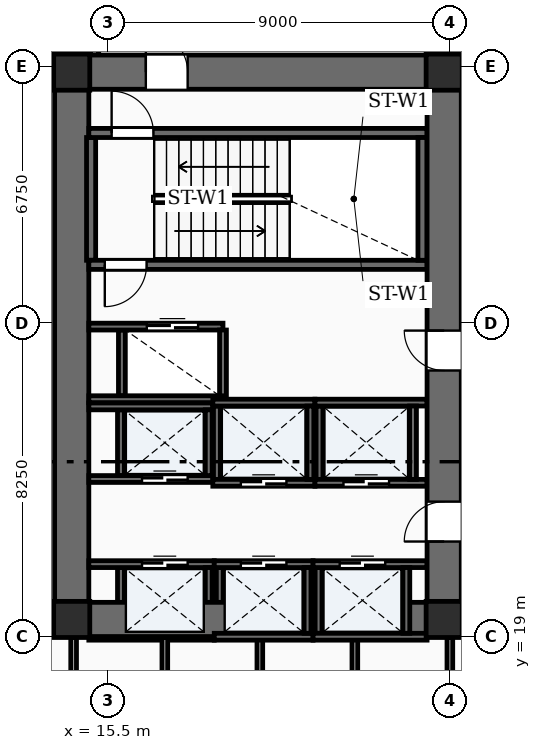
"""IFC4 building model, lengths in metres.
Left out: names, types, materials, properties, quantities, classifications, styles, units other than length and angle.
Written with IfcOpenShell. Run it as: python <this file> out.ifc"""

import sys

from ifc_helpers import new_model, si_unit, direction, frame, frame_2d, origin, origin_2d, place, context, subcontext, project, spatial, rectangle, extrude, element, fill, save


model = new_model("IFC4")
c1 = context("Model", 3, precision=1e-05, world=origin(), true_north=direction((0.0, 1.0)))
c2 = subcontext(c1, "Body", "Model", "MODEL_VIEW")
j1 = project(units=[si_unit("LENGTHUNIT", "METRE"), si_unit("PLANEANGLEUNIT", "RADIAN")], contexts=[c1])
p1 = place(None, origin())
s1 = spatial("IfcSite", under=j1, at=p1, CompositionType="ELEMENT")
p2 = place(p1, origin())
s2 = spatial("IfcBuilding", under=s1, at=p2, CompositionType="ELEMENT")
p3 = place(p2, origin())
s3 = spatial("IfcBuildingStorey", under=s2, at=p3, CompositionType="ELEMENT", Elevation=0.0)
p4 = place(p3, frame((14.55, 19.0, -0.45), z_axis=(0.0, 0.0, 1.0), x_axis=(0.0, 1.0, 0.0)))
e1 = element("IfcWall", 1, at=p4, inside=s3, PredefinedType="SHEAR", context=c2, shape_type="SweptSolid", body=[
    extrude(rectangle(XDim=15.3, YDim=0.9, at=frame_2d((7.65, 0.0))), origin(), (0.0, 0.0, 1.0), 8.1),
])
p5 = place(p3, frame((24.35, 19.0, -0.45), z_axis=(0.0, 0.0, 1.0), x_axis=(0.0, 1.0, 0.0)))
e2 = element("IfcWall", 2, at=p5, inside=s3, PredefinedType="SHEAR", context=c2, shape_type="SweptSolid", body=[
    extrude(rectangle(XDim=15.3, YDim=0.9, at=frame_2d((7.65, 0.0))), origin(), (0.0, 0.0, 1.0), 8.1),
])
p6 = place(p5, frame((2.5, 0.0, 0.45)))
e3 = element("IfcOpeningElement", 3, at=p6, cuts=e2, PredefinedType="OPENING", context=c2, shape_type="SweptSolid", body=[
    extrude(rectangle(XDim=1.05, YDim=2.15, at=frame_2d((0.525, 1.075))), frame((0.0, 0.46, 0.0), z_axis=(0.0, -1.0, 0.0), x_axis=(1.0, 0.0, 0.0)), (0.0, 0.0, 1.0), 0.92),
])
p7 = place(p5, frame((7.0, 0.0, 0.45)))
e4 = element("IfcOpeningElement", 4, at=p7, cuts=e2, PredefinedType="OPENING", context=c2, shape_type="SweptSolid", body=[
    extrude(rectangle(XDim=1.05, YDim=2.15, at=frame_2d((0.525, 1.075))), frame((0.0, 0.46, 0.0), z_axis=(0.0, -1.0, 0.0), x_axis=(1.0, 0.0, 0.0)), (0.0, 0.0, 1.0), 0.92),
])
p8 = place(p3, frame((15.0, 19.45, -0.45), z_axis=(0.0, 0.0, 1.0), x_axis=(1.0, 0.0, 0.0)))
e5 = element("IfcWall", 5, at=p8, inside=s3, PredefinedType="SHEAR", context=c2, shape_type="SweptSolid", body=[
    extrude(rectangle(XDim=8.9, YDim=0.9, at=frame_2d((4.45, 0.0))), origin(), (0.0, 0.0, 1.0), 8.1),
])
p9 = place(p3, frame((15.0, 33.85, -0.45), z_axis=(0.0, 0.0, 1.0), x_axis=(1.0, 0.0, 0.0)))
e6 = element("IfcWall", 6, at=p9, inside=s3, PredefinedType="SHEAR", context=c2, shape_type="SweptSolid", body=[
    extrude(rectangle(XDim=8.9, YDim=0.9, at=frame_2d((4.45, 0.0))), origin(), (0.0, 0.0, 1.0), 8.1),
])
p10 = place(p9, frame((1.5, 0.0, 0.45)))
e7 = element("IfcOpeningElement", 7, at=p10, cuts=e6, PredefinedType="OPENING", context=c2, shape_type="SweptSolid", body=[
    extrude(rectangle(XDim=1.1, YDim=2.15, at=frame_2d((0.55, 1.075))), frame((0.0, 0.46, 0.0), z_axis=(0.0, -1.0, 0.0), x_axis=(1.0, 0.0, 0.0)), (0.0, 0.0, 1.0), 0.92),
])
for number, where, z_axis, x_axis in (
    (8, (14.55, 19.45, -0.45), (0.0, 0.0, 1.0), (1.0, 0.0, 0.0)),
    (9, (24.35, 19.45, -0.45), (0.0, 0.0, 1.0), (1.0, 0.0, 0.0)),
    (10, (14.55, 33.85, -0.45), (0.0, 0.0, 1.0), (1.0, 0.0, 0.0)),
    (11, (24.35, 33.85, -0.45), (0.0, 0.0, 1.0), (1.0, 0.0, 0.0)),
):
    element("IfcColumn", number, at=place(p3, frame(where, z_axis=z_axis, x_axis=x_axis)), inside=s3, PredefinedType="COLUMN", context=c2, shape_type="SweptSolid", body=[
        extrude(rectangle(XDim=0.95, YDim=0.95, at=origin_2d()), origin(), (0.0, 0.0, 1.0), 8.1),
    ])
p11 = place(p3, frame((23.9, 28.78, 0.0), z_axis=(0.0, 0.0, 1.0), x_axis=(-1.0, 0.0, 0.0)))
e12 = element("IfcWall", 12, at=p11, inside=s3, PredefinedType="SOLIDWALL", context=c2, shape_type="SweptSolid", body=[
    extrude(rectangle(XDim=8.9, YDim=0.24, at=frame_2d((4.45, 0.0))), origin(), (0.0, 0.0, 1.0), 7.65),
])
p12 = place(p11, frame((7.38, 0.0, 0.0)))
e13 = element("IfcOpeningElement", 13, at=p12, cuts=e12, PredefinedType="OPENING", context=c2, shape_type="SweptSolid", body=[
    extrude(rectangle(XDim=1.1, YDim=2.15, at=frame_2d((0.55, 1.075))), frame((0.0, 0.13, 0.0), z_axis=(0.0, -1.0, 0.0), x_axis=(1.0, 0.0, 0.0)), (0.0, 0.0, 1.0), 0.26),
])
p13 = place(p3, frame((15.0, 32.25, 0.0), z_axis=(0.0, 0.0, 1.0), x_axis=(1.0, 0.0, 0.0)))
e14 = element("IfcWall", 14, at=p13, inside=s3, PredefinedType="SOLIDWALL", context=c2, shape_type="SweptSolid", body=[
    extrude(rectangle(XDim=8.9, YDim=0.24, at=frame_2d((4.45, 0.0))), origin(), (0.0, 0.0, 1.0), 7.65),
])
p14 = place(p13, frame((0.6, 0.0, 0.0)))
e15 = element("IfcOpeningElement", 15, at=p14, cuts=e14, PredefinedType="OPENING", context=c2, shape_type="SweptSolid", body=[
    extrude(rectangle(XDim=1.1, YDim=2.15, at=frame_2d((0.55, 1.075))), frame((0.0, 0.13, 0.0), z_axis=(0.0, -1.0, 0.0), x_axis=(1.0, 0.0, 0.0)), (0.0, 0.0, 1.0), 0.26),
])
for number, where, z_axis, x_axis in (
    (16, (15.06, 28.9, 0.0), (0.0, 0.0, 1.0), (0.0, 1.0, 0.0)),
    (17, (23.78, 28.9, 0.0), (0.0, 0.0, 1.0), (0.0, 1.0, 0.0)),
):
    element("IfcWall", number, at=place(p3, frame(where, z_axis=z_axis, x_axis=x_axis)), inside=s3, PredefinedType="SOLIDWALL", context=c2, shape_type="SweptSolid", body=[
        extrude(rectangle(XDim=3.23, YDim=0.24, at=frame_2d((1.615, 0.0))), origin(), (0.0, 0.0, 1.0), 7.65),
    ])
p15 = place(p3, frame((15.0, 20.905, 0.0), z_axis=(0.0, 0.0, 1.0), x_axis=(1.0, 0.0, 0.0)))
e18 = element("IfcWall", 18, at=p15, inside=s3, PredefinedType="SOLIDWALL", context=c2, shape_type="SweptSolid", body=[
    extrude(rectangle(XDim=3.3, YDim=0.18, at=frame_2d((1.65, 0.0))), origin(), (0.0, 0.0, 1.0), 7.65),
])
p16 = place(p15, frame((1.4, 0.0, 0.0)))
e19 = element("IfcOpeningElement", 19, at=p16, cuts=e18, PredefinedType="OPENING", context=c2, shape_type="SweptSolid", body=[
    extrude(rectangle(XDim=1.2, YDim=2.2, at=frame_2d((0.6, 1.1))), frame((0.0, 0.1, 0.0), z_axis=(0.0, -1.0, 0.0), x_axis=(1.0, 0.0, 0.0)), (0.0, 0.0, 1.0), 0.2),
])
p17 = place(p3, frame((15.0, 18.995, 0.0), z_axis=(0.0, 0.0, 1.0), x_axis=(1.0, 0.0, 0.0)))
e20 = element("IfcWall", 20, at=p17, inside=s3, PredefinedType="SOLIDWALL", context=c2, shape_type="SweptSolid", body=[
    extrude(rectangle(XDim=3.3, YDim=0.18, at=frame_2d((1.65, 0.0))), origin(), (0.0, 0.0, 1.0), 7.65),
])
for number, where, z_axis, x_axis in (
    (21, (15.845, 19.085, 0.0), (0.0, 0.0, 1.0), (0.0, 1.0, 0.0)),
    (22, (18.155, 19.085, 0.0), (0.0, 0.0, 1.0), (0.0, 1.0, 0.0)),
):
    element("IfcWall", number, at=place(p3, frame(where, z_axis=z_axis, x_axis=x_axis)), inside=s3, PredefinedType="SOLIDWALL", context=c2, shape_type="SweptSolid", body=[
        extrude(rectangle(XDim=1.73, YDim=0.18, at=frame_2d((0.865, 0.0))), origin(), (0.0, 0.0, 1.0), 7.65),
    ])
p18 = place(p3, frame((18.3, 20.905, 0.0), z_axis=(0.0, 0.0, 1.0), x_axis=(1.0, 0.0, 0.0)))
e23 = element("IfcWall", 23, at=p18, inside=s3, PredefinedType="SOLIDWALL", context=c2, shape_type="SweptSolid", body=[
    extrude(rectangle(XDim=2.6, YDim=0.18, at=frame_2d((1.3, 0.0))), origin(), (0.0, 0.0, 1.0), 7.65),
])
p19 = place(p18, frame((0.7, 0.0, 0.0)))
e24 = element("IfcOpeningElement", 24, at=p19, cuts=e23, PredefinedType="OPENING", context=c2, shape_type="SweptSolid", body=[
    extrude(rectangle(XDim=1.2, YDim=2.2, at=frame_2d((0.6, 1.1))), frame((0.0, 0.1, 0.0), z_axis=(0.0, -1.0, 0.0), x_axis=(1.0, 0.0, 0.0)), (0.0, 0.0, 1.0), 0.2),
])
p20 = place(p3, frame((18.3, 18.995, 0.0), z_axis=(0.0, 0.0, 1.0), x_axis=(1.0, 0.0, 0.0)))
e25 = element("IfcWall", 25, at=p20, inside=s3, PredefinedType="SOLIDWALL", context=c2, shape_type="SweptSolid", body=[
    extrude(rectangle(XDim=2.6, YDim=0.18, at=frame_2d((1.3, 0.0))), origin(), (0.0, 0.0, 1.0), 7.65),
])
for number, where, z_axis, x_axis in (
    (26, (18.445, 19.085, 0.0), (0.0, 0.0, 1.0), (0.0, 1.0, 0.0)),
    (27, (20.755, 19.085, 0.0), (0.0, 0.0, 1.0), (0.0, 1.0, 0.0)),
):
    element("IfcWall", number, at=place(p3, frame(where, z_axis=z_axis, x_axis=x_axis)), inside=s3, PredefinedType="SOLIDWALL", context=c2, shape_type="SweptSolid", body=[
        extrude(rectangle(XDim=1.73, YDim=0.18, at=frame_2d((0.865, 0.0))), origin(), (0.0, 0.0, 1.0), 7.65),
    ])
p21 = place(p3, frame((20.9, 20.905, 0.0), z_axis=(0.0, 0.0, 1.0), x_axis=(1.0, 0.0, 0.0)))
e28 = element("IfcWall", 28, at=p21, inside=s3, PredefinedType="SOLIDWALL", context=c2, shape_type="SweptSolid", body=[
    extrude(rectangle(XDim=3.0, YDim=0.18, at=frame_2d((1.5, 0.0))), origin(), (0.0, 0.0, 1.0), 7.65),
])
p22 = place(p21, frame((0.7, 0.0, 0.0)))
e29 = element("IfcOpeningElement", 29, at=p22, cuts=e28, PredefinedType="OPENING", context=c2, shape_type="SweptSolid", body=[
    extrude(rectangle(XDim=1.2, YDim=2.2, at=frame_2d((0.6, 1.1))), frame((0.0, 0.1, 0.0), z_axis=(0.0, -1.0, 0.0), x_axis=(1.0, 0.0, 0.0)), (0.0, 0.0, 1.0), 0.2),
])
p23 = place(p3, frame((20.9, 18.995, 0.0), z_axis=(0.0, 0.0, 1.0), x_axis=(1.0, 0.0, 0.0)))
e30 = element("IfcWall", 30, at=p23, inside=s3, PredefinedType="SOLIDWALL", context=c2, shape_type="SweptSolid", body=[
    extrude(rectangle(XDim=3.0, YDim=0.18, at=frame_2d((1.5, 0.0))), origin(), (0.0, 0.0, 1.0), 7.65),
])
for number, where, z_axis, x_axis in (
    (31, (21.045, 19.085, 0.0), (0.0, 0.0, 1.0), (0.0, 1.0, 0.0)),
    (32, (23.355, 19.085, 0.0), (0.0, 0.0, 1.0), (0.0, 1.0, 0.0)),
):
    element("IfcWall", number, at=place(p3, frame(where, z_axis=z_axis, x_axis=x_axis)), inside=s3, PredefinedType="SOLIDWALL", context=c2, shape_type="SweptSolid", body=[
        extrude(rectangle(XDim=1.73, YDim=0.18, at=frame_2d((0.865, 0.0))), origin(), (0.0, 0.0, 1.0), 7.65),
    ])
p24 = place(p3, frame((15.0, 25.055, 0.0), z_axis=(0.0, 0.0, 1.0), x_axis=(1.0, 0.0, 0.0)))
e33 = element("IfcWall", 33, at=p24, inside=s3, PredefinedType="SOLIDWALL", context=c2, shape_type="SweptSolid", body=[
    extrude(rectangle(XDim=3.262, YDim=0.18, at=frame_2d((1.631, 0.0))), origin(), (0.0, 0.0, 1.0), 7.65),
])
p25 = place(p3, frame((15.0, 23.145, 0.0), z_axis=(0.0, 0.0, 1.0), x_axis=(1.0, 0.0, 0.0)))
e34 = element("IfcWall", 34, at=p25, inside=s3, PredefinedType="SOLIDWALL", context=c2, shape_type="SweptSolid", body=[
    extrude(rectangle(XDim=3.262, YDim=0.18, at=frame_2d((1.631, 0.0))), origin(), (0.0, 0.0, 1.0), 7.65),
])
p26 = place(p25, frame((1.4, 0.0, 0.0)))
e35 = element("IfcOpeningElement", 35, at=p26, cuts=e34, PredefinedType="OPENING", context=c2, shape_type="SweptSolid", body=[
    extrude(rectangle(XDim=1.2, YDim=2.2, at=frame_2d((0.6, 1.1))), frame((0.0, 0.1, 0.0), z_axis=(0.0, -1.0, 0.0), x_axis=(1.0, 0.0, 0.0)), (0.0, 0.0, 1.0), 0.2),
])
for number, where, z_axis, x_axis in (
    (36, (15.845, 23.235, 0.0), (0.0, 0.0, 1.0), (0.0, 1.0, 0.0)),
    (37, (18.155, 23.235, 0.0), (0.0, 0.0, 1.0), (0.0, 1.0, 0.0)),
):
    element("IfcWall", number, at=place(p3, frame(where, z_axis=z_axis, x_axis=x_axis)), inside=s3, PredefinedType="SOLIDWALL", context=c2, shape_type="SweptSolid", body=[
        extrude(rectangle(XDim=1.73, YDim=0.18, at=frame_2d((0.865, 0.0))), origin(), (0.0, 0.0, 1.0), 7.65),
    ])
p27 = place(p3, frame((18.262, 25.155, 0.0), z_axis=(0.0, 0.0, 1.0), x_axis=(1.0, 0.0, 0.0)))
e38 = element("IfcWall", 38, at=p27, inside=s3, PredefinedType="SOLIDWALL", context=c2, shape_type="SweptSolid", body=[
    extrude(rectangle(XDim=2.688, YDim=0.18, at=frame_2d((1.344, 0.0))), origin(), (0.0, 0.0, 1.0), 7.65),
])
p28 = place(p3, frame((18.262, 23.045, 0.0), z_axis=(0.0, 0.0, 1.0), x_axis=(1.0, 0.0, 0.0)))
e39 = element("IfcWall", 39, at=p28, inside=s3, PredefinedType="SOLIDWALL", context=c2, shape_type="SweptSolid", body=[
    extrude(rectangle(XDim=2.688, YDim=0.18, at=frame_2d((1.344, 0.0))), origin(), (0.0, 0.0, 1.0), 7.65),
])
p29 = place(p28, frame((0.738, 0.0, 0.0)))
e40 = element("IfcOpeningElement", 40, at=p29, cuts=e39, PredefinedType="OPENING", context=c2, shape_type="SweptSolid", body=[
    extrude(rectangle(XDim=1.2, YDim=2.2, at=frame_2d((0.6, 1.1))), frame((0.0, 0.1, 0.0), z_axis=(0.0, -1.0, 0.0), x_axis=(1.0, 0.0, 0.0)), (0.0, 0.0, 1.0), 0.2),
])
for number, where, z_axis, x_axis in (
    (41, (18.37, 23.135, 0.0), (0.0, 0.0, 1.0), (0.0, 1.0, 0.0)),
    (42, (20.83, 23.135, 0.0), (0.0, 0.0, 1.0), (0.0, 1.0, 0.0)),
):
    element("IfcWall", number, at=place(p3, frame(where, z_axis=z_axis, x_axis=x_axis)), inside=s3, PredefinedType="SOLIDWALL", context=c2, shape_type="SweptSolid", body=[
        extrude(rectangle(XDim=1.93, YDim=0.18, at=frame_2d((0.965, 0.0))), origin(), (0.0, 0.0, 1.0), 7.65),
    ])
p30 = place(p3, frame((20.95, 25.155, 0.0), z_axis=(0.0, 0.0, 1.0), x_axis=(1.0, 0.0, 0.0)))
e43 = element("IfcWall", 43, at=p30, inside=s3, PredefinedType="SOLIDWALL", context=c2, shape_type="SweptSolid", body=[
    extrude(rectangle(XDim=2.95, YDim=0.18, at=frame_2d((1.475, 0.0))), origin(), (0.0, 0.0, 1.0), 7.65),
])
p31 = place(p3, frame((20.95, 23.045, 0.0), z_axis=(0.0, 0.0, 1.0), x_axis=(1.0, 0.0, 0.0)))
e44 = element("IfcWall", 44, at=p31, inside=s3, PredefinedType="SOLIDWALL", context=c2, shape_type="SweptSolid", body=[
    extrude(rectangle(XDim=2.95, YDim=0.18, at=frame_2d((1.475, 0.0))), origin(), (0.0, 0.0, 1.0), 7.65),
])
p32 = place(p31, frame((0.75, 0.0, 0.0)))
e45 = element("IfcOpeningElement", 45, at=p32, cuts=e44, PredefinedType="OPENING", context=c2, shape_type="SweptSolid", body=[
    extrude(rectangle(XDim=1.2, YDim=2.2, at=frame_2d((0.6, 1.1))), frame((0.0, 0.1, 0.0), z_axis=(0.0, -1.0, 0.0), x_axis=(1.0, 0.0, 0.0)), (0.0, 0.0, 1.0), 0.2),
])
for number, where, z_axis, x_axis in (
    (46, (21.07, 23.135, 0.0), (0.0, 0.0, 1.0), (0.0, 1.0, 0.0)),
    (47, (23.53, 23.135, 0.0), (0.0, 0.0, 1.0), (0.0, 1.0, 0.0)),
):
    element("IfcWall", number, at=place(p3, frame(where, z_axis=z_axis, x_axis=x_axis)), inside=s3, PredefinedType="SOLIDWALL", context=c2, shape_type="SweptSolid", body=[
        extrude(rectangle(XDim=1.93, YDim=0.18, at=frame_2d((0.965, 0.0))), origin(), (0.0, 0.0, 1.0), 7.65),
    ])
p33 = place(p3, frame((15.0, 27.155, 0.0), z_axis=(0.0, 0.0, 1.0), x_axis=(1.0, 0.0, 0.0)))
e48 = element("IfcWall", 48, at=p33, inside=s3, PredefinedType="SOLIDWALL", context=c2, shape_type="SweptSolid", body=[
    extrude(rectangle(XDim=3.53, YDim=0.18, at=frame_2d((1.765, 0.0))), origin(), (0.0, 0.0, 1.0), 7.65),
])
p34 = place(p33, frame((1.525, 0.0, 0.0)))
e49 = element("IfcOpeningElement", 49, at=p34, cuts=e48, PredefinedType="OPENING", context=c2, shape_type="SweptSolid", body=[
    extrude(rectangle(XDim=1.35, YDim=2.3, at=frame_2d((0.675, 1.15))), frame((0.0, 0.1, 0.0), z_axis=(0.0, -1.0, 0.0), x_axis=(1.0, 0.0, 0.0)), (0.0, 0.0, 1.0), 0.2),
])
p35 = place(p3, frame((15.0, 25.245, 0.0), z_axis=(0.0, 0.0, 1.0), x_axis=(1.0, 0.0, 0.0)))
e50 = element("IfcWall", 50, at=p35, inside=s3, PredefinedType="SOLIDWALL", context=c2, shape_type="SweptSolid", body=[
    extrude(rectangle(XDim=3.53, YDim=0.18, at=frame_2d((1.765, 0.0))), origin(), (0.0, 0.0, 1.0), 7.65),
])
for number, where, z_axis, x_axis in (
    (51, (15.87, 25.335, 0.0), (0.0, 0.0, 1.0), (0.0, 1.0, 0.0)),
    (52, (18.53, 25.335, 0.0), (0.0, 0.0, 1.0), (0.0, 1.0, 0.0)),
):
    element("IfcWall", number, at=place(p3, frame(where, z_axis=z_axis, x_axis=x_axis)), inside=s3, PredefinedType="SOLIDWALL", context=c2, shape_type="SweptSolid", body=[
        extrude(rectangle(XDim=1.73, YDim=0.18, at=frame_2d((0.865, 0.0))), origin(), (0.0, 0.0, 1.0), 7.65),
    ])
for number, where, z_axis, x_axis in (
    (53, (17.0, 15.4, 0.0), (0.0, 0.0, 1.0), (0.0, 1.0, 0.0)),
    (54, (19.5, 15.4, 0.0), (0.0, 0.0, 1.0), (0.0, 1.0, 0.0)),
    (55, (22.0, 15.4, 0.0), (0.0, 0.0, 1.0), (0.0, 1.0, 0.0)),
    (56, (14.6, 15.4, 0.0), (0.0, 0.0, 1.0), (0.0, 1.0, 0.0)),
    (57, (24.5, 15.4, 0.0), (0.0, 0.0, 1.0), (0.0, 1.0, 0.0)),
):
    element("IfcWall", number, at=place(p3, frame(where, z_axis=z_axis, x_axis=x_axis)), inside=s3, PredefinedType="PARTITIONING", context=c2, shape_type="SweptSolid", body=[
        extrude(rectangle(XDim=3.58, YDim=0.15, at=frame_2d((1.79, 0.0))), origin(), (0.0, 0.0, 1.0), 6.71),
    ])
for number, where, z_axis, x_axis in (
    (58, (15.15, 34.3, 0.0), (0.0, 0.0, 1.0), (0.0, 1.0, 0.0)),
    (59, (24.35, 34.3, 0.0), (0.0, 0.0, 1.0), (0.0, 1.0, 0.0)),
):
    element("IfcWall", number, at=place(p3, frame(where, z_axis=z_axis, x_axis=x_axis)), inside=s3, PredefinedType="SOLIDWALL", context=c2, shape_type="SweptSolid", body=[
        extrude(rectangle(XDim=19.8, YDim=0.22, at=frame_2d((9.9, 0.0))), origin(), (0.0, 0.0, 1.0), 6.71),
    ])
p36 = place(p6, origin())
e60 = element("IfcDoor", 60, at=p36, inside=s3, OperationType="SINGLE_SWING_LEFT", PredefinedType="DOOR", context=c2, shape_type="SweptSolid", body=[
    extrude(rectangle(XDim=1.05, YDim=2.15, at=frame_2d((0.525, 1.075))), frame((0.0, 0.025, 0.0), z_axis=(0.0, -1.0, 0.0), x_axis=(1.0, 0.0, 0.0)), (0.0, 0.0, 1.0), 0.05),
])
fill(e3, e60)
p37 = place(p7, origin())
e61 = element("IfcDoor", 61, at=p37, inside=s3, OperationType="SINGLE_SWING_RIGHT", PredefinedType="DOOR", context=c2, shape_type="SweptSolid", body=[
    extrude(rectangle(XDim=1.05, YDim=2.15, at=frame_2d((0.525, 1.075))), frame((0.0, 0.025, 0.0), z_axis=(0.0, -1.0, 0.0), x_axis=(1.0, 0.0, 0.0)), (0.0, 0.0, 1.0), 0.05),
])
fill(e4, e61)
p38 = place(p10, origin())
e62 = element("IfcDoor", 62, at=p38, inside=s3, OperationType="SINGLE_SWING_LEFT", PredefinedType="DOOR", context=c2, shape_type="SweptSolid", body=[
    extrude(rectangle(XDim=1.1, YDim=2.15, at=frame_2d((0.55, 1.075))), frame((0.0, 0.025, 0.0), z_axis=(0.0, -1.0, 0.0), x_axis=(1.0, 0.0, 0.0)), (0.0, 0.0, 1.0), 0.05),
])
fill(e7, e62)
p39 = place(p12, origin())
e63 = element("IfcDoor", 63, at=p39, inside=s3, OperationType="SINGLE_SWING_RIGHT", PredefinedType="DOOR", context=c2, shape_type="SweptSolid", body=[
    extrude(rectangle(XDim=1.1, YDim=2.15, at=frame_2d((0.55, 1.075))), frame((0.0, 0.025, 0.0), z_axis=(0.0, -1.0, 0.0), x_axis=(1.0, 0.0, 0.0)), (0.0, 0.0, 1.0), 0.05),
])
fill(e13, e63)
p40 = place(p14, origin())
e64 = element("IfcDoor", 64, at=p40, inside=s3, OperationType="SINGLE_SWING_LEFT", PredefinedType="DOOR", context=c2, shape_type="SweptSolid", body=[
    extrude(rectangle(XDim=1.1, YDim=2.15, at=frame_2d((0.55, 1.075))), frame((0.0, 0.025, 0.0), z_axis=(0.0, -1.0, 0.0), x_axis=(1.0, 0.0, 0.0)), (0.0, 0.0, 1.0), 0.05),
])
fill(e15, e64)
p41 = place(p16, origin())
e65 = element("IfcDoor", 65, at=p41, inside=s3, OperationType="DOUBLE_DOOR_SLIDING", PredefinedType="DOOR", context=c2, shape_type="SweptSolid", body=[
    extrude(rectangle(XDim=1.2, YDim=2.2, at=frame_2d((0.6, 1.1))), frame((0.0, 0.025, 0.0), z_axis=(0.0, -1.0, 0.0), x_axis=(1.0, 0.0, 0.0)), (0.0, 0.0, 1.0), 0.05),
])
fill(e19, e65)
p42 = place(p19, origin())
e66 = element("IfcDoor", 66, at=p42, inside=s3, OperationType="DOUBLE_DOOR_SLIDING", PredefinedType="DOOR", context=c2, shape_type="SweptSolid", body=[
    extrude(rectangle(XDim=1.2, YDim=2.2, at=frame_2d((0.6, 1.1))), frame((0.0, 0.025, 0.0), z_axis=(0.0, -1.0, 0.0), x_axis=(1.0, 0.0, 0.0)), (0.0, 0.0, 1.0), 0.05),
])
fill(e24, e66)
p43 = place(p22, origin())
e67 = element("IfcDoor", 67, at=p43, inside=s3, OperationType="DOUBLE_DOOR_SLIDING", PredefinedType="DOOR", context=c2, shape_type="SweptSolid", body=[
    extrude(rectangle(XDim=1.2, YDim=2.2, at=frame_2d((0.6, 1.1))), frame((0.0, 0.025, 0.0), z_axis=(0.0, -1.0, 0.0), x_axis=(1.0, 0.0, 0.0)), (0.0, 0.0, 1.0), 0.05),
])
fill(e29, e67)
p44 = place(p26, origin())
e68 = element("IfcDoor", 68, at=p44, inside=s3, OperationType="DOUBLE_DOOR_SLIDING", PredefinedType="DOOR", context=c2, shape_type="SweptSolid", body=[
    extrude(rectangle(XDim=1.2, YDim=2.2, at=frame_2d((0.6, 1.1))), frame((0.0, 0.025, 0.0), z_axis=(0.0, -1.0, 0.0), x_axis=(1.0, 0.0, 0.0)), (0.0, 0.0, 1.0), 0.05),
])
fill(e35, e68)
p45 = place(p29, origin())
e69 = element("IfcDoor", 69, at=p45, inside=s3, OperationType="DOUBLE_DOOR_SLIDING", PredefinedType="DOOR", context=c2, shape_type="SweptSolid", body=[
    extrude(rectangle(XDim=1.2, YDim=2.2, at=frame_2d((0.6, 1.1))), frame((0.0, 0.025, 0.0), z_axis=(0.0, -1.0, 0.0), x_axis=(1.0, 0.0, 0.0)), (0.0, 0.0, 1.0), 0.05),
])
fill(e40, e69)
p46 = place(p32, origin())
e70 = element("IfcDoor", 70, at=p46, inside=s3, OperationType="DOUBLE_DOOR_SLIDING", PredefinedType="DOOR", context=c2, shape_type="SweptSolid", body=[
    extrude(rectangle(XDim=1.2, YDim=2.2, at=frame_2d((0.6, 1.1))), frame((0.0, 0.025, 0.0), z_axis=(0.0, -1.0, 0.0), x_axis=(1.0, 0.0, 0.0)), (0.0, 0.0, 1.0), 0.05),
])
fill(e45, e70)
p47 = place(p34, origin())
e71 = element("IfcDoor", 71, at=p47, inside=s3, OperationType="DOUBLE_DOOR_SLIDING", PredefinedType="DOOR", context=c2, shape_type="SweptSolid", body=[
    extrude(rectangle(XDim=1.35, YDim=2.3, at=frame_2d((0.675, 1.15))), frame((0.0, 0.025, 0.0), z_axis=(0.0, -1.0, 0.0), x_axis=(1.0, 0.0, 0.0)), (0.0, 0.0, 1.0), 0.05),
])
fill(e49, e71)
save(model, sys.argv[1])
